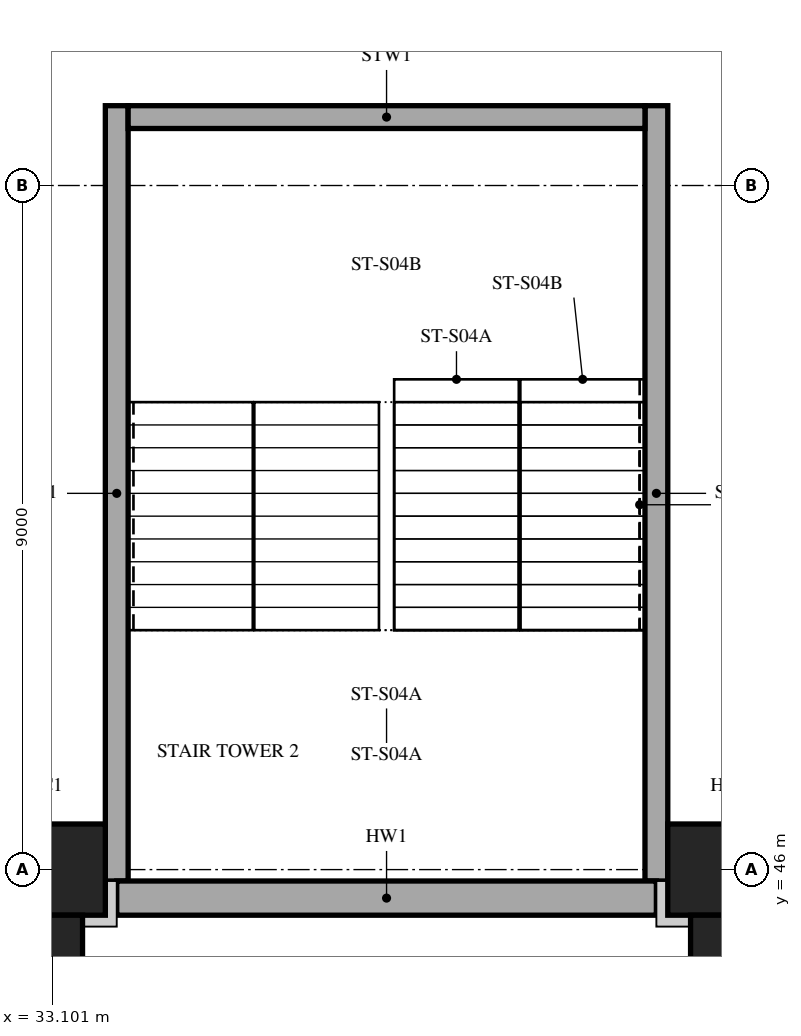
"""IFC4 building model, lengths in metres.
Left out: names, types, materials, properties, quantities, classifications, styles, units other than length and angle.
Written with IfcOpenShell. Run it as: python <this file> out.ifc"""

import sys

from ifc_helpers import new_model, si_unit, direction, frame, frame_2d, origin, origin_2d, place, context, subcontext, project, spatial, rectangle, extrude, element, save


model = new_model("IFC4")
c1 = context("Model", 3, precision=1e-05, world=origin(), true_north=direction((0.0, 1.0)))
c2 = subcontext(c1, "Body", "Model", "MODEL_VIEW")
j1 = project(units=[si_unit("LENGTHUNIT", "METRE"), si_unit("PLANEANGLEUNIT", "RADIAN")], contexts=[c1])
p1 = place(None, origin())
s1 = spatial("IfcSite", under=j1, at=p1, CompositionType="ELEMENT")
p2 = place(p1, origin())
s2 = spatial("IfcBuilding", under=s1, at=p2, CompositionType="ELEMENT")
p3 = place(p2, frame((0.0, 0.0, 5.0)))
s3 = spatial("IfcBuildingStorey", under=s2, at=p3, CompositionType="ELEMENT", Elevation=5.0)
for number, where, z_axis, x_axis in (
    (1, (33.0, 46.0, 0.0), (0.0, 0.0, 1.0), (1.0, 0.0, 0.0)),
    (2, (42.0, 46.0, 0.0), (0.0, 0.0, 1.0), (1.0, 0.0, 0.0)),
):
    element("IfcColumn", number, at=place(p3, frame(where, z_axis=z_axis, x_axis=x_axis)), inside=s3, PredefinedType="COLUMN", context=c2, shape_type="SweptSolid", body=[
        extrude(rectangle(XDim=1.6, YDim=1.2, at=origin_2d()), origin(), (0.0, 0.0, 1.0), 5.0),
    ])
for number, where, z_axis, x_axis in (
    (3, (33.95, 45.85, 0.0), (0.0, 0.0, 1.0), (0.0, 1.0, 0.0)),
    (4, (41.05, 45.85, 0.0), (0.0, 0.0, 1.0), (0.0, 1.0, 0.0)),
):
    element("IfcWall", number, at=place(p3, frame(where, z_axis=z_axis, x_axis=x_axis)), inside=s3, PredefinedType="SHEAR", context=c2, shape_type="SweptSolid", body=[
        extrude(rectangle(XDim=10.2, YDim=0.3, at=frame_2d((5.1, 0.0))), origin(), (0.0, 0.0, 1.0), 5.0),
    ])
p4 = place(p3, frame((34.1, 55.9, 0.0), z_axis=(0.0, 0.0, 1.0), x_axis=(1.0, 0.0, 0.0)))
e5 = element("IfcWall", 5, at=p4, inside=s3, PredefinedType="SHEAR", context=c2, shape_type="SweptSolid", body=[
    extrude(rectangle(XDim=6.8, YDim=0.3, at=frame_2d((3.4, 0.0))), origin(), (0.0, 0.0, 1.0), 5.0),
])
for number, where, z_axis, x_axis in (
    (6, (33.0, 44.9, 0.0), (0.0, 0.0, 1.0), (1.0, 0.0, 0.0)),
    (7, (42.0, 44.9, 0.0), (0.0, 0.0, 1.0), (1.0, 0.0, 0.0)),
):
    element("IfcColumn", number, at=place(p3, frame(where, z_axis=z_axis, x_axis=x_axis)), inside=s3, PredefinedType="COLUMN", context=c2, shape_type="SweptSolid", body=[
        extrude(rectangle(XDim=1.0, YDim=1.0, at=origin_2d()), origin(), (0.0, 0.0, 1.0), 5.0),
    ])
p5 = place(p3, frame((33.95, 45.625, 0.0), z_axis=(0.0, 0.0, 1.0), x_axis=(1.0, 0.0, 0.0)))
e8 = element("IfcWall", 8, at=p5, inside=s3, PredefinedType="SOLIDWALL", context=c2, shape_type="SweptSolid", body=[
    extrude(rectangle(XDim=7.1, YDim=0.45, at=frame_2d((3.55, 0.0))), origin(), (0.0, 0.0, 1.0), 5.0),
])
save(model, sys.argv[1])
